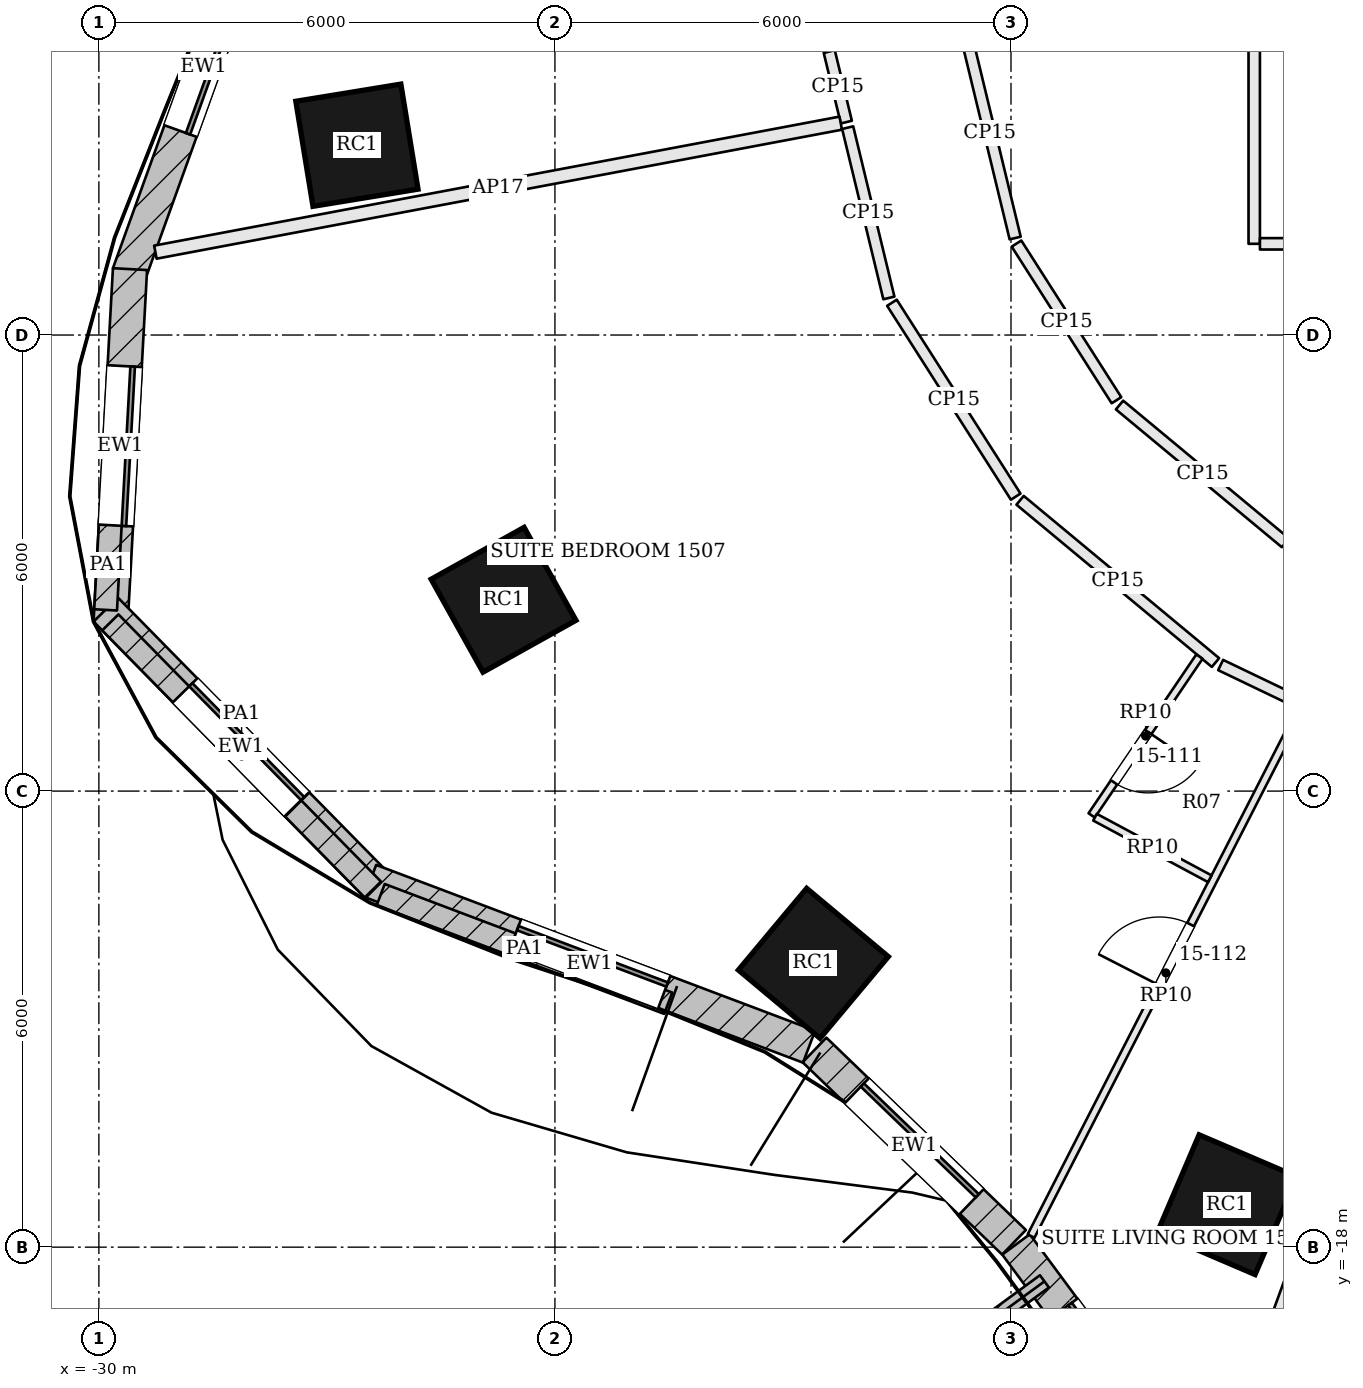
"""IFC4 building model, lengths in metres.
Left out: names, types, materials, properties, quantities, classifications, styles, units other than length and angle.
Written with IfcOpenShell. Run it as: python <this file> out.ifc"""

import sys

from ifc_helpers import new_model, si_unit, direction, frame, frame_2d, origin, origin_2d, place, context, subcontext, project, spatial, rectangle, extrude, element, fill, save


model = new_model("IFC4")
c1 = context("Model", 3, precision=1e-05, world=origin(), true_north=direction((0.0, 1.0)))
c2 = subcontext(c1, "Body", "Model", "MODEL_VIEW")
j1 = project(units=[si_unit("LENGTHUNIT", "METRE"), si_unit("PLANEANGLEUNIT", "RADIAN")], contexts=[c1])
p1 = place(None, origin())
s1 = spatial("IfcSite", under=j1, at=p1, CompositionType="ELEMENT")
p2 = place(p1, origin())
s2 = spatial("IfcBuilding", under=s1, at=p2, CompositionType="ELEMENT")
p3 = place(p2, frame((0.0, 0.0, 69.9)))
s3 = spatial("IfcBuildingStorey", under=s2, at=p3, CompositionType="ELEMENT", Elevation=69.9)
for number, where, z_axis, x_axis in (
    (1, (-26.605, -3.503, 0.0), (0.0, 0.0, 1.0), (0.161, -0.987, 0.0)),
    (2, (-24.676, -9.483, 0.0), (0.0, 0.0, 1.0), (0.487, -0.873, 0.0)),
    (3, (-20.6, -14.266, 0.0), (0.0, 0.0, 1.0), (0.767, -0.641, 0.0)),
    (4, (-15.157, -17.441, 0.0), (0.0, 0.0, 1.0), (0.919, -0.394, 0.0)),
):
    element("IfcColumn", number, at=place(p3, frame(where, z_axis=z_axis, x_axis=x_axis)), inside=s3, PredefinedType="COLUMN", context=c2, shape_type="SweptSolid", body=[
        extrude(rectangle(XDim=1.4, YDim=1.4, at=origin_2d()), origin(), (0.0, 0.0, 1.0), 3.6),
    ])
p4 = place(p3, frame((-27.638, 0.257, 0.0), z_axis=(0.0, 0.0, 1.0), x_axis=(-0.338914809068, -0.940817066275, 0.0)))
e5 = element("IfcWall", 5, at=p4, inside=s3, PredefinedType="SOLIDWALL", context=c2, shape_type="SweptSolid", body=[
    extrude(rectangle(XDim=5.797, YDim=0.45, at=frame_2d((2.899, 0.0))), origin(), (0.0, 0.0, 1.0), 3.4),
])
p5 = place(p4, frame((1.999, 0.0, 0.9)))
e6 = element("IfcOpeningElement", 6, at=p5, cuts=e5, PredefinedType="OPENING", context=c2, shape_type="SweptSolid", body=[
    extrude(rectangle(XDim=1.8, YDim=2.0, at=frame_2d((0.9, 1.0))), frame((0.0, 0.235, 0.0), z_axis=(0.0, -1.0, 0.0), x_axis=(1.0, 0.0, 0.0)), (0.0, 0.0, 1.0), 0.47),
])
p6 = place(p3, frame((-29.59, -5.133, 0.0), z_axis=(0.0, 0.0, 1.0), x_axis=(-0.054738225791, -0.998500739427, 0.0)))
e7 = element("IfcWall", 7, at=p6, inside=s3, PredefinedType="SOLIDWALL", context=c2, shape_type="SweptSolid", body=[
    extrude(rectangle(XDim=4.656, YDim=0.45, at=frame_2d((2.328, 0.0))), origin(), (0.0, 0.0, 1.0), 3.4),
])
p7 = place(p6, frame((1.278, 0.0, 0.9)))
e8 = element("IfcOpeningElement", 8, at=p7, cuts=e7, PredefinedType="OPENING", context=c2, shape_type="SweptSolid", body=[
    extrude(rectangle(XDim=2.1, YDim=2.0, at=frame_2d((1.05, 1.0))), frame((0.0, 0.235, 0.0), z_axis=(0.0, -1.0, 0.0), x_axis=(1.0, 0.0, 0.0)), (0.0, 0.0, 1.0), 0.47),
])
p8 = place(p3, frame((-29.909, -9.612, 0.0), z_axis=(0.0, 0.0, 1.0), x_axis=(0.700902433902, -0.713257161303, 0.0)))
e9 = element("IfcWall", 9, at=p8, inside=s3, PredefinedType="SOLIDWALL", context=c2, shape_type="SweptSolid", body=[
    extrude(rectangle(XDim=5.079, YDim=0.45, at=frame_2d((2.539, 0.0))), origin(), (0.0, 0.0, 1.0), 3.4),
])
p9 = place(p8, frame((1.489, 0.0, 0.9)))
e10 = element("IfcOpeningElement", 10, at=p9, cuts=e9, PredefinedType="OPENING", context=c2, shape_type="SweptSolid", body=[
    extrude(rectangle(XDim=2.1, YDim=2.0, at=frame_2d((1.05, 1.0))), frame((0.0, 0.235, 0.0), z_axis=(0.0, -1.0, 0.0), x_axis=(1.0, 0.0, 0.0)), (0.0, 0.0, 1.0), 0.47),
])
p10 = place(p3, frame((-26.431, -13.182, 0.0), z_axis=(0.0, 0.0, 1.0), x_axis=(0.935540074321, -0.35322056755, 0.0)))
e11 = element("IfcWall", 11, at=p10, inside=s3, PredefinedType="SOLIDWALL", context=c2, shape_type="SweptSolid", body=[
    extrude(rectangle(XDim=6.172, YDim=0.45, at=frame_2d((3.086, 0.0))), origin(), (0.0, 0.0, 1.0), 3.4),
])
p11 = place(p10, frame((2.036, 0.0, 0.9)))
e12 = element("IfcOpeningElement", 12, at=p11, cuts=e11, PredefinedType="OPENING", context=c2, shape_type="SweptSolid", body=[
    extrude(rectangle(XDim=2.1, YDim=2.0, at=frame_2d((1.05, 1.0))), frame((0.0, 0.235, 0.0), z_axis=(0.0, -1.0, 0.0), x_axis=(1.0, 0.0, 0.0)), (0.0, 0.0, 1.0), 0.47),
])
p12 = place(p3, frame((-20.585, -15.406, 0.0), z_axis=(0.0, 0.0, 1.0), x_axis=(0.719978118026, -0.693996764808, 0.0)))
e13 = element("IfcWall", 13, at=p12, inside=s3, PredefinedType="SOLIDWALL", context=c2, shape_type="SweptSolid", body=[
    extrude(rectangle(XDim=3.646, YDim=0.45, at=frame_2d((1.823, 0.0))), origin(), (0.0, 0.0, 1.0), 3.4),
])
p13 = place(p12, frame((0.773, 0.0, 0.9)))
e14 = element("IfcOpeningElement", 14, at=p13, cuts=e13, PredefinedType="OPENING", context=c2, shape_type="SweptSolid", body=[
    extrude(rectangle(XDim=2.1, YDim=2.0, at=frame_2d((1.05, 1.0))), frame((0.0, 0.235, 0.0), z_axis=(0.0, -1.0, 0.0), x_axis=(1.0, 0.0, 0.0)), (0.0, 0.0, 1.0), 0.47),
])
p14 = place(p3, frame((-17.934, -17.964, 0.0), z_axis=(0.0, 0.0, 1.0), x_axis=(0.594544447368, -0.804062746372, 0.0)))
e15 = element("IfcWall", 15, at=p14, inside=s3, PredefinedType="SOLIDWALL", context=c2, shape_type="SweptSolid", body=[
    extrude(rectangle(XDim=4.207, YDim=0.45, at=frame_2d((2.103, 0.0))), origin(), (0.0, 0.0, 1.0), 3.4),
])
p15 = place(p14, frame((1.053, 0.0, 0.9)))
e16 = element("IfcOpeningElement", 16, at=p15, cuts=e15, PredefinedType="OPENING", context=c2, shape_type="SweptSolid", body=[
    extrude(rectangle(XDim=2.1, YDim=2.0, at=frame_2d((1.05, 1.0))), frame((0.0, 0.235, 0.0), z_axis=(0.0, -1.0, 0.0), x_axis=(1.0, 0.0, 0.0)), (0.0, 0.0, 1.0), 0.47),
])
p16 = place(p3, frame((-17.56, -18.45, 0.0), z_axis=(0.0, 0.0, 1.0), x_axis=(-0.807091943364, -0.590425774299, 0.0)))
e17 = element("IfcWall", 17, at=p16, inside=s3, PredefinedType="SOLIDWALL", context=c2, shape_type="SweptSolid", body=[
    extrude(rectangle(XDim=1.75, YDim=0.2, at=frame_2d((0.875, 0.0))), origin(), (0.0, 0.0, 1.0), 3.4),
])
p17 = place(p3, frame((-29.846, -8.422, 3.6), z_axis=(0.0, 0.0, 1.0), x_axis=(-0.054723601839, -0.998501541011, 0.0)))
e18 = element("IfcWall", 18, at=p17, inside=s3, PredefinedType="PARAPET", context=c2, shape_type="SweptSolid", body=[
    extrude(rectangle(XDim=1.196, YDim=0.3, at=frame_2d((0.598, 0.0))), origin(), (0.0, 0.0, 1.0), 1.1),
])
p18 = place(p3, frame((-29.849, -9.781, 3.6), z_axis=(0.0, 0.0, 1.0), x_axis=(0.700911537772, -0.713248215012, 0.0)))
e19 = element("IfcWall", 19, at=p18, inside=s3, PredefinedType="PARAPET", context=c2, shape_type="SweptSolid", body=[
    extrude(rectangle(XDim=4.928, YDim=0.3, at=frame_2d((2.464, 0.0))), origin(), (0.0, 0.0, 1.0), 1.1),
])
p19 = place(p3, frame((-26.292, -13.363, 3.6), z_axis=(0.0, 0.0, 1.0), x_axis=(0.93551777481, -0.353279624397, 0.0)))
e20 = element("IfcWall", 20, at=p19, inside=s3, PredefinedType="PARAPET", context=c2, shape_type="SweptSolid", body=[
    extrude(rectangle(XDim=4.043, YDim=0.3, at=frame_2d((2.022, 0.0))), origin(), (0.0, 0.0, 1.0), 1.1),
])
p20 = place(p3, frame((-20.391, -2.271, 0.0), z_axis=(0.0, 0.0, 1.0), x_axis=(0.235307200809, -0.971921046818, 0.0)))
e21 = element("IfcWall", 21, at=p20, inside=s3, PredefinedType="PARTITIONING", context=c2, shape_type="SweptSolid", body=[
    extrude(rectangle(XDim=0.955, YDim=0.15, at=frame_2d((0.477, 0.0))), origin(), (0.0, 0.0, 1.0), 2.68),
])
p21 = place(p3, frame((-29.257, -4.91, 0.0), z_axis=(0.0, 0.0, 1.0), x_axis=(0.982745434227, 0.184963270695, 0.0)))
e22 = element("IfcWall", 22, at=p21, inside=s3, PredefinedType="PARTITIONING", context=c2, shape_type="SweptSolid", body=[
    extrude(rectangle(XDim=9.175, YDim=0.175, at=frame_2d((4.587, 0.0))), origin(), (0.0, 0.0, 1.0), 2.68),
])
p22 = place(p3, frame((-20.149, -3.272, 0.0), z_axis=(0.0, 0.0, 1.0), x_axis=(0.235227162998, -0.971940420905, 0.0)))
e23 = element("IfcWall", 23, at=p22, inside=s3, PredefinedType="PARTITIONING", context=c2, shape_type="SweptSolid", body=[
    extrude(rectangle(XDim=2.305, YDim=0.15, at=frame_2d((1.153, 0.0))), origin(), (0.0, 0.0, 1.0), 2.68),
])
p23 = place(p3, frame((-19.566, -5.575, 0.0), z_axis=(0.0, 0.0, 1.0), x_axis=(0.538039111825, -0.842919874096, 0.0)))
e24 = element("IfcWall", 24, at=p23, inside=s3, PredefinedType="PARTITIONING", context=c2, shape_type="SweptSolid", body=[
    extrude(rectangle(XDim=3.026, YDim=0.15, at=frame_2d((1.513, 0.0))), origin(), (0.0, 0.0, 1.0), 2.68),
])
p24 = place(p3, frame((-17.88, -8.174, 0.0), z_axis=(0.0, 0.0, 1.0), x_axis=(0.769369909016, -0.638803524646, 0.0)))
e25 = element("IfcWall", 25, at=p24, inside=s3, PredefinedType="PARTITIONING", context=c2, shape_type="SweptSolid", body=[
    extrude(rectangle(XDim=3.342, YDim=0.15, at=frame_2d((1.671, 0.0))), origin(), (0.0, 0.0, 1.0), 2.68),
])
p25 = place(p3, frame((-15.242, -10.341, 0.0), z_axis=(0.0, 0.0, 1.0), x_axis=(0.901691201137, -0.432380593682, 0.0)))
e26 = element("IfcWall", 26, at=p25, inside=s3, PredefinedType="PARTITIONING", context=c2, shape_type="SweptSolid", body=[
    extrude(rectangle(XDim=3.669, YDim=0.15, at=frame_2d((1.834, 0.0))), origin(), (0.0, 0.0, 1.0), 2.68),
])
p26 = place(p25, frame((1.937, 0.0, 0.0)))
e27 = element("IfcOpeningElement", 27, at=p26, cuts=e26, PredefinedType="OPENING", context=c2, shape_type="SweptSolid", body=[
    extrude(rectangle(XDim=1.0, YDim=2.1, at=frame_2d((0.5, 1.05))), frame((0.0, 0.085, 0.0), z_axis=(0.0, -1.0, 0.0), x_axis=(1.0, 0.0, 0.0)), (0.0, 0.0, 1.0), 0.17),
])
p27 = place(p3, frame((-15.299, -21.143, 0.0), z_axis=(0.0, 0.0, 1.0), x_axis=(0.343019355323, 0.9393283355, 0.0)))
e28 = element("IfcWall", 28, at=p27, inside=s3, PredefinedType="PARTITIONING", context=c2, shape_type="SweptSolid", body=[
    extrude(rectangle(XDim=9.735, YDim=0.175, at=frame_2d((4.868, 0.0))), origin(), (0.0, 0.0, 1.0), 2.68),
])
p28 = place(p3, frame((-14.388, -8.734, 0.0), z_axis=(0.0, 0.0, 1.0), x_axis=(-0.769376381092, 0.63879572965, 0.0)))
e29 = element("IfcWall", 29, at=p28, inside=s3, PredefinedType="PARTITIONING", context=c2, shape_type="SweptSolid", body=[
    extrude(rectangle(XDim=2.838, YDim=0.15, at=frame_2d((1.419, 0.0))), origin(), (0.0, 0.0, 1.0), 2.68),
])
p29 = place(p3, frame((-16.612, -6.858, 0.0), z_axis=(0.0, 0.0, 1.0), x_axis=(-0.53797355371, 0.842961716514, 0.0)))
e30 = element("IfcWall", 30, at=p29, inside=s3, PredefinedType="PARTITIONING", context=c2, shape_type="SweptSolid", body=[
    extrude(rectangle(XDim=2.445, YDim=0.15, at=frame_2d((1.222, 0.0))), origin(), (0.0, 0.0, 1.0), 2.68),
])
p30 = place(p3, frame((-17.945, -4.724, 0.0), z_axis=(0.0, 0.0, 1.0), x_axis=(-0.235203730389, 0.971946091721, 0.0)))
e31 = element("IfcWall", 31, at=p30, inside=s3, PredefinedType="PARTITIONING", context=c2, shape_type="SweptSolid", body=[
    extrude(rectangle(XDim=2.839, YDim=0.15, at=frame_2d((1.419, 0.0))), origin(), (0.0, 0.0, 1.0), 2.68),
])
p31 = place(p3, frame((-14.8, 8.297, 0.0), z_axis=(0.0, 0.0, 1.0), x_axis=(0.0, -1.0, 0.0)))
e32 = element("IfcWall", 32, at=p31, inside=s3, PredefinedType="PARTITIONING", context=c2, shape_type="SweptSolid", body=[
    extrude(rectangle(XDim=13.097, YDim=0.15, at=frame_2d((6.549, 0.0))), origin(), (0.0, 0.0, 1.0), 2.68),
])
p32 = place(p31, frame((3.611, 0.0, 0.0)))
e33 = element("IfcOpeningElement", 33, at=p32, cuts=e32, PredefinedType="OPENING", context=c2, shape_type="SweptSolid", body=[
    extrude(rectangle(XDim=1.0, YDim=2.1, at=frame_2d((0.5, 1.05))), frame((0.0, 0.085, 0.0), z_axis=(0.0, -1.0, 0.0), x_axis=(1.0, 0.0, 0.0)), (0.0, 0.0, 1.0), 0.17),
])
p33 = place(p3, frame((-14.725, -4.8, 0.0), z_axis=(0.0, 0.0, 1.0), x_axis=(1.0, 0.0, 0.0)))
e34 = element("IfcWall", 34, at=p33, inside=s3, PredefinedType="PARTITIONING", context=c2, shape_type="SweptSolid", body=[
    extrude(rectangle(XDim=29.525, YDim=0.15, at=frame_2d((14.763, 0.0))), origin(), (0.0, 0.0, 1.0), 2.68),
])
p34 = place(p33, frame((3.425, 0.0, 0.0)))
e35 = element("IfcOpeningElement", 35, at=p34, cuts=e34, PredefinedType="OPENING", context=c2, shape_type="SweptSolid", body=[
    extrude(rectangle(XDim=1.8, YDim=2.1, at=frame_2d((0.9, 1.05))), frame((0.0, 0.085, 0.0), z_axis=(0.0, -1.0, 0.0), x_axis=(1.0, 0.0, 0.0)), (0.0, 0.0, 1.0), 0.17),
])
p35 = place(p33, frame((13.825, 0.0, 0.0)))
e36 = element("IfcOpeningElement", 36, at=p35, cuts=e34, PredefinedType="OPENING", context=c2, shape_type="SweptSolid", body=[
    extrude(rectangle(XDim=1.8, YDim=2.1, at=frame_2d((0.9, 1.05))), frame((0.0, 0.085, 0.0), z_axis=(0.0, -1.0, 0.0), x_axis=(1.0, 0.0, 0.0)), (0.0, 0.0, 1.0), 0.17),
])
p36 = place(p33, frame((24.225, 0.0, 0.0)))
e37 = element("IfcOpeningElement", 37, at=p36, cuts=e34, PredefinedType="OPENING", context=c2, shape_type="SweptSolid", body=[
    extrude(rectangle(XDim=1.8, YDim=2.1, at=frame_2d((0.9, 1.05))), frame((0.0, 0.085, 0.0), z_axis=(0.0, -1.0, 0.0), x_axis=(1.0, 0.0, 0.0)), (0.0, 0.0, 1.0), 0.17),
])
p37 = place(p3, frame((-17.736, -17.854, 0.0), z_axis=(0.0, 0.0, 1.0), x_axis=(0.455828577063, 0.890067586385, 0.0)))
e38 = element("IfcWall", 38, at=p37, inside=s3, PredefinedType="PARTITIONING", context=c2, shape_type="SweptSolid", body=[
    extrude(rectangle(XDim=7.78, YDim=0.1, at=frame_2d((3.89, 0.0))), origin(), (0.0, 0.0, 1.0), 2.898),
])
p38 = place(p37, frame((3.705, 0.0, 0.0)))
e39 = element("IfcOpeningElement", 39, at=p38, cuts=e38, PredefinedType="OPENING", context=c2, shape_type="SweptSolid", body=[
    extrude(rectangle(XDim=0.9, YDim=2.4, at=frame_2d((0.45, 1.2))), frame((0.0, 0.06, 0.0), z_axis=(0.0, -1.0, 0.0), x_axis=(1.0, 0.0, 0.0)), (0.0, 0.0, 1.0), 0.12),
])
p39 = place(p3, frame((-15.521, -10.23, 0.0), z_axis=(0.0, 0.0, 1.0), x_axis=(-0.561553433558, -0.827440475962, 0.0)))
e40 = element("IfcWall", 40, at=p39, inside=s3, PredefinedType="PARTITIONING", context=c2, shape_type="SweptSolid", body=[
    extrude(rectangle(XDim=2.525, YDim=0.1, at=frame_2d((1.263, 0.0))), origin(), (0.0, 0.0, 1.0), 2.898),
])
p40 = place(p39, frame((1.2, 0.0, 0.0)))
e41 = element("IfcOpeningElement", 41, at=p40, cuts=e40, PredefinedType="OPENING", context=c2, shape_type="SweptSolid", body=[
    extrude(rectangle(XDim=0.8, YDim=2.1, at=frame_2d((0.4, 1.05))), frame((0.0, 0.06, 0.0), z_axis=(0.0, -1.0, 0.0), x_axis=(1.0, 0.0, 0.0)), (0.0, 0.0, 1.0), 0.12),
])
p41 = place(p3, frame((-16.895, -12.344, 0.0), z_axis=(0.0, 0.0, 1.0), x_axis=(0.881325283606, -0.472510046958, 0.0)))
e42 = element("IfcWall", 42, at=p41, inside=s3, PredefinedType="PARTITIONING", context=c2, shape_type="SweptSolid", body=[
    extrude(rectangle(XDim=1.713, YDim=0.1, at=frame_2d((0.857, 0.0))), origin(), (0.0, 0.0, 1.0), 2.898),
])
p42 = place(p5, origin())
e43 = element("IfcWindow", 43, at=p42, inside=s3, PartitioningType="SINGLE_PANEL", PredefinedType="WINDOW", context=c2, shape_type="SweptSolid", body=[
    extrude(rectangle(XDim=1.8, YDim=2.0, at=frame_2d((0.9, 1.0))), frame((0.0, 0.135, 0.0), z_axis=(0.0, -1.0, 0.0), x_axis=(1.0, 0.0, 0.0)), (0.0, 0.0, 1.0), 0.06),
])
fill(e6, e43)
p43 = place(p7, origin())
e44 = element("IfcWindow", 44, at=p43, inside=s3, PartitioningType="SINGLE_PANEL", PredefinedType="WINDOW", context=c2, shape_type="SweptSolid", body=[
    extrude(rectangle(XDim=2.1, YDim=2.0, at=frame_2d((1.05, 1.0))), frame((0.0, 0.135, 0.0), z_axis=(0.0, -1.0, 0.0), x_axis=(1.0, 0.0, 0.0)), (0.0, 0.0, 1.0), 0.06),
])
fill(e8, e44)
p44 = place(p9, origin())
e45 = element("IfcWindow", 45, at=p44, inside=s3, PartitioningType="SINGLE_PANEL", PredefinedType="WINDOW", context=c2, shape_type="SweptSolid", body=[
    extrude(rectangle(XDim=2.1, YDim=2.0, at=frame_2d((1.05, 1.0))), frame((0.0, 0.135, 0.0), z_axis=(0.0, -1.0, 0.0), x_axis=(1.0, 0.0, 0.0)), (0.0, 0.0, 1.0), 0.06),
])
fill(e10, e45)
p45 = place(p11, origin())
e46 = element("IfcWindow", 46, at=p45, inside=s3, PartitioningType="SINGLE_PANEL", PredefinedType="WINDOW", context=c2, shape_type="SweptSolid", body=[
    extrude(rectangle(XDim=2.1, YDim=2.0, at=frame_2d((1.05, 1.0))), frame((0.0, 0.135, 0.0), z_axis=(0.0, -1.0, 0.0), x_axis=(1.0, 0.0, 0.0)), (0.0, 0.0, 1.0), 0.06),
])
fill(e12, e46)
p46 = place(p13, origin())
e47 = element("IfcWindow", 47, at=p46, inside=s3, PartitioningType="SINGLE_PANEL", PredefinedType="WINDOW", context=c2, shape_type="SweptSolid", body=[
    extrude(rectangle(XDim=2.1, YDim=2.0, at=frame_2d((1.05, 1.0))), frame((0.0, 0.135, 0.0), z_axis=(0.0, -1.0, 0.0), x_axis=(1.0, 0.0, 0.0)), (0.0, 0.0, 1.0), 0.06),
])
fill(e14, e47)
p47 = place(p15, origin())
e48 = element("IfcWindow", 48, at=p47, inside=s3, PartitioningType="SINGLE_PANEL", PredefinedType="WINDOW", context=c2, shape_type="SweptSolid", body=[
    extrude(rectangle(XDim=2.1, YDim=2.0, at=frame_2d((1.05, 1.0))), frame((0.0, 0.135, 0.0), z_axis=(0.0, -1.0, 0.0), x_axis=(1.0, 0.0, 0.0)), (0.0, 0.0, 1.0), 0.06),
])
fill(e16, e48)
p48 = place(p40, origin())
e49 = element("IfcDoor", 49, at=p48, inside=s3, OperationType="SINGLE_SWING_LEFT", PredefinedType="DOOR", context=c2, shape_type="SweptSolid", body=[
    extrude(rectangle(XDim=0.8, YDim=2.1, at=frame_2d((0.4, 1.05))), frame((0.0, 0.025, 0.0), z_axis=(0.0, -1.0, 0.0), x_axis=(1.0, 0.0, 0.0)), (0.0, 0.0, 1.0), 0.05),
])
fill(e41, e49)
p49 = place(p38, origin())
e50 = element("IfcDoor", 50, at=p49, inside=s3, OperationType="SINGLE_SWING_LEFT", PredefinedType="DOOR", context=c2, shape_type="SweptSolid", body=[
    extrude(rectangle(XDim=0.9, YDim=2.4, at=frame_2d((0.45, 1.2))), frame((0.0, 0.025, 0.0), z_axis=(0.0, -1.0, 0.0), x_axis=(1.0, 0.0, 0.0)), (0.0, 0.0, 1.0), 0.05),
])
fill(e39, e50)
save(model, sys.argv[1])
